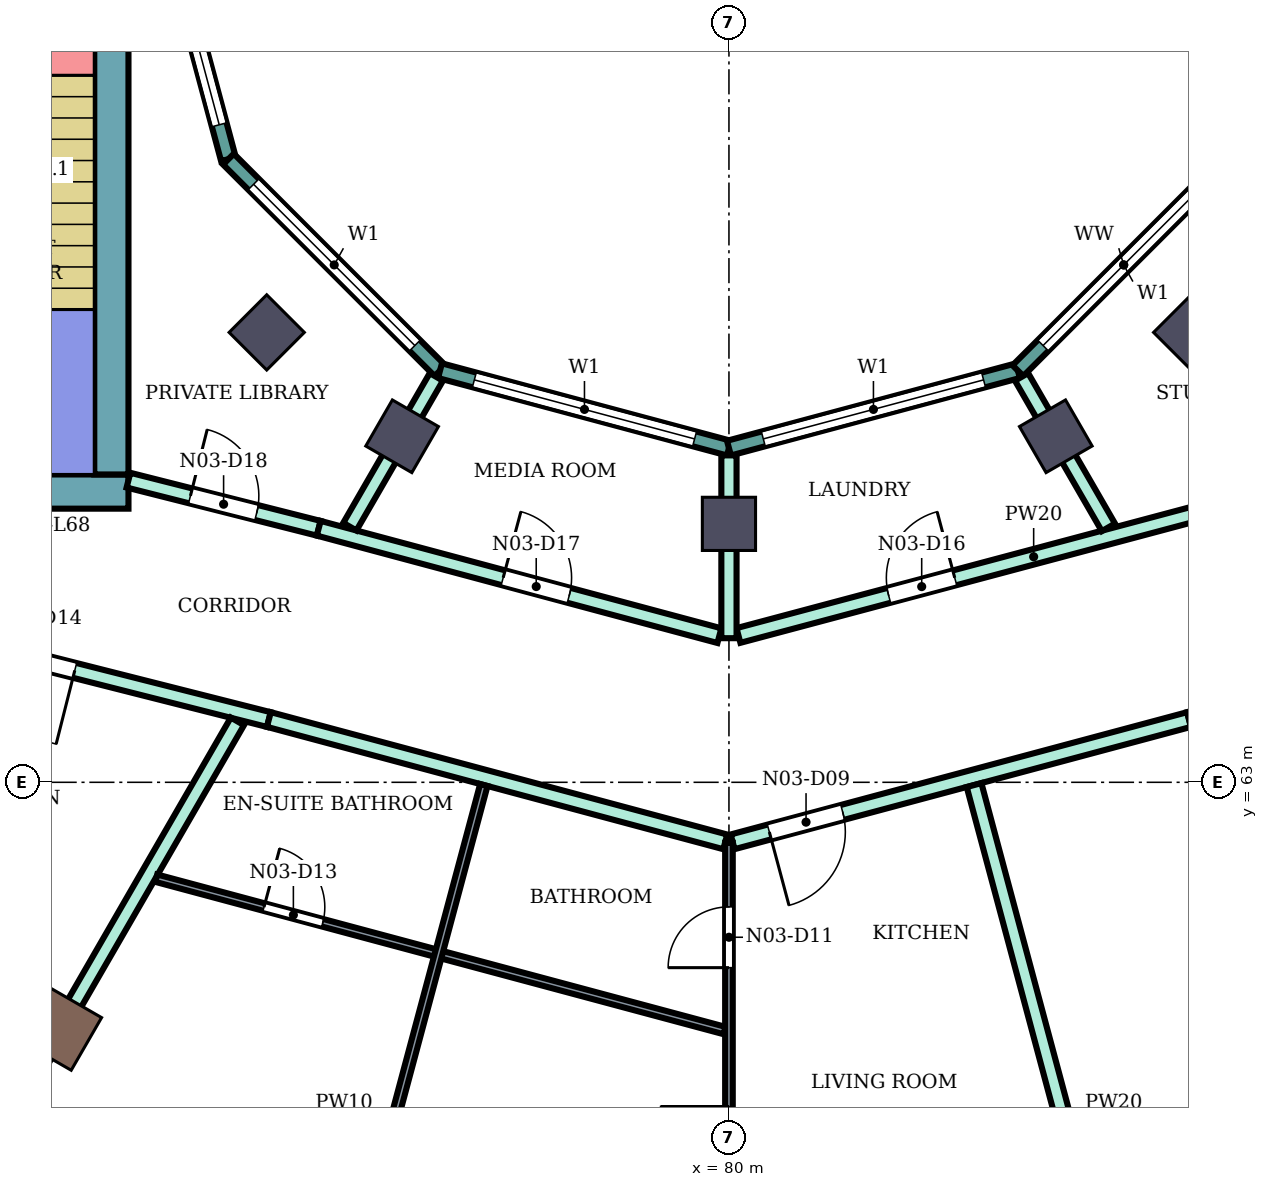
"""IFC4 building model, lengths in metres.
Left out: names, types, materials, properties, quantities, classifications, styles, units other than length and angle.
Written with IfcOpenShell. Run it as: python <this file> out.ifc"""

import sys

from ifc_helpers import new_model, si_unit, direction, frame, frame_2d, origin, origin_2d, place, context, subcontext, project, spatial, rectangle, extrude, element, fill, save


model = new_model("IFC4")
c1 = context("Model", 3, precision=1e-05, world=origin(), true_north=direction((0.0, 1.0)))
c2 = subcontext(c1, "Body", "Model", "MODEL_VIEW")
j1 = project(units=[si_unit("LENGTHUNIT", "METRE"), si_unit("PLANEANGLEUNIT", "RADIAN")], contexts=[c1])
p1 = place(None, origin())
s1 = spatial("IfcSite", under=j1, at=p1, CompositionType="ELEMENT")
p2 = place(p1, origin())
s2 = spatial("IfcBuilding", under=s1, at=p2, CompositionType="ELEMENT")
p3 = place(p2, frame((0.0, 0.0, 296.7)))
s3 = spatial("IfcBuildingStorey", under=s2, at=p3, CompositionType="ELEMENT", Elevation=296.7)
p4 = place(p3, frame((71.2, 59.758, 0.0), z_axis=(0.0, 0.0, 1.0), x_axis=(-0.5, -0.866025403784, 0.0)))
e1 = element("IfcColumn", 1, at=p4, inside=s3, PredefinedType="COLUMN", context=c2, shape_type="SweptSolid", body=[
    extrude(rectangle(XDim=0.8, YDim=0.8, at=origin_2d()), origin(), (0.0, 0.0, 1.0), 4.2),
])
for number, where, z_axis, x_axis in (
    (2, (73.919, 68.919, 0.0), (0.0, 0.0, 1.0), (-0.707, -0.707, 0.0)),
    (3, (75.7, 67.552, 0.0), (0.0, 0.0, 1.0), (-0.5, -0.866, 0.0)),
    (4, (80.0, 66.4, 0.0), (0.0, 0.0, 1.0), (0.0, -1.0, 0.0)),
    (5, (84.3, 67.552, 0.0), (0.0, 0.0, 1.0), (0.5, -0.866, 0.0)),
    (6, (86.081, 68.919, 0.0), (0.0, 0.0, 1.0), (0.707, -0.707, 0.0)),
):
    element("IfcColumn", number, at=place(p3, frame(where, z_axis=z_axis, x_axis=x_axis)), inside=s3, PredefinedType="COLUMN", context=c2, shape_type="SweptSolid", body=[
        extrude(rectangle(XDim=0.7, YDim=0.7, at=origin_2d()), origin(), (0.0, 0.0, 1.0), 4.2),
    ])
p5 = place(p3, frame((72.1, 66.825, 0.0), z_axis=(0.0, 0.0, 1.0), x_axis=(-1.0, 0.0, 0.0)))
e7 = element("IfcWall", 7, at=p5, inside=s3, PredefinedType="SHEAR", context=c2, shape_type="SweptSolid", body=[
    extrude(rectangle(XDim=12.0, YDim=0.45, at=frame_2d((6.0, 0.0))), origin(), (0.0, 0.0, 1.0), 3.88),
])
p6 = place(p5, frame((4.2, 0.0, 0.0)))
e8 = element("IfcOpeningElement", 8, at=p6, cuts=e7, PredefinedType="OPENING", context=c2, shape_type="SweptSolid", body=[
    extrude(rectangle(XDim=2.4, YDim=2.4, at=frame_2d((1.2, 1.2))), frame((0.0, 0.235, 0.0), z_axis=(0.0, -1.0, 0.0), x_axis=(1.0, 0.0, 0.0)), (0.0, 0.0, 1.0), 0.47),
])
p7 = place(p3, frame((71.875, 75.0, 0.0), z_axis=(0.0, 0.0, 1.0), x_axis=(0.0, -1.0, 0.0)))
e9 = element("IfcWall", 9, at=p7, inside=s3, PredefinedType="SHEAR", context=c2, shape_type="SweptSolid", body=[
    extrude(rectangle(XDim=7.95, YDim=0.45, at=frame_2d((3.975, 0.0))), origin(), (0.0, 0.0, 1.0), 3.88),
])
p8 = place(p3, frame((72.396, 75.0, 0.0), z_axis=(0.0, 0.0, 1.0), x_axis=(0.258789828301, -0.965933654434, 0.0)))
e10 = element("IfcWall", 10, at=p8, inside=s3, PredefinedType="NOTDEFINED", context=c2, shape_type="SweptSolid", body=[
    extrude(rectangle(XDim=3.936, YDim=0.2, at=frame_2d((1.968, 0.0))), origin(), (0.0, 0.0, 1.0), 4.2),
])
p9 = place(p8, frame((0.468, 0.0, 0.9)))
e11 = element("IfcOpeningElement", 11, at=p9, cuts=e10, PredefinedType="OPENING", context=c2, shape_type="SweptSolid", body=[
    extrude(rectangle(XDim=3.0, YDim=2.3, at=frame_2d((1.5, 1.15))), frame((0.0, 0.11, 0.0), z_axis=(0.0, -1.0, 0.0), x_axis=(1.0, 0.0, 0.0)), (0.0, 0.0, 1.0), 0.22),
])
p10 = place(p3, frame((73.415, 71.198, 0.0), z_axis=(0.0, 0.0, 1.0), x_axis=(0.707106781187, -0.707106781187, 0.0)))
e12 = element("IfcWall", 12, at=p10, inside=s3, PredefinedType="NOTDEFINED", context=c2, shape_type="SweptSolid", body=[
    extrude(rectangle(XDim=3.936, YDim=0.2, at=frame_2d((1.968, 0.0))), origin(), (0.0, 0.0, 1.0), 4.2),
])
p11 = place(p10, frame((0.468, 0.0, 0.9)))
e13 = element("IfcOpeningElement", 13, at=p11, cuts=e12, PredefinedType="OPENING", context=c2, shape_type="SweptSolid", body=[
    extrude(rectangle(XDim=3.0, YDim=2.3, at=frame_2d((1.5, 1.15))), frame((0.0, 0.11, 0.0), z_axis=(0.0, -1.0, 0.0), x_axis=(1.0, 0.0, 0.0)), (0.0, 0.0, 1.0), 0.22),
])
p12 = place(p3, frame((76.198, 68.415, 0.0), z_axis=(0.0, 0.0, 1.0), x_axis=(0.965933654434, -0.258789828301, 0.0)))
e14 = element("IfcWall", 14, at=p12, inside=s3, PredefinedType="NOTDEFINED", context=c2, shape_type="SweptSolid", body=[
    extrude(rectangle(XDim=3.936, YDim=0.2, at=frame_2d((1.968, 0.0))), origin(), (0.0, 0.0, 1.0), 4.2),
])
p13 = place(p12, frame((0.468, 0.0, 0.9)))
e15 = element("IfcOpeningElement", 15, at=p13, cuts=e14, PredefinedType="OPENING", context=c2, shape_type="SweptSolid", body=[
    extrude(rectangle(XDim=3.0, YDim=2.3, at=frame_2d((1.5, 1.15))), frame((0.0, 0.11, 0.0), z_axis=(0.0, -1.0, 0.0), x_axis=(1.0, 0.0, 0.0)), (0.0, 0.0, 1.0), 0.22),
])
p14 = place(p3, frame((80.0, 67.396, 0.0), z_axis=(0.0, 0.0, 1.0), x_axis=(0.965933654434, 0.258789828301, 0.0)))
e16 = element("IfcWall", 16, at=p14, inside=s3, PredefinedType="NOTDEFINED", context=c2, shape_type="SweptSolid", body=[
    extrude(rectangle(XDim=3.936, YDim=0.2, at=frame_2d((1.968, 0.0))), origin(), (0.0, 0.0, 1.0), 4.2),
])
p15 = place(p14, frame((0.468, 0.0, 0.9)))
e17 = element("IfcOpeningElement", 17, at=p15, cuts=e16, PredefinedType="OPENING", context=c2, shape_type="SweptSolid", body=[
    extrude(rectangle(XDim=3.0, YDim=2.3, at=frame_2d((1.5, 1.15))), frame((0.0, 0.11, 0.0), z_axis=(0.0, -1.0, 0.0), x_axis=(1.0, 0.0, 0.0)), (0.0, 0.0, 1.0), 0.22),
])
p16 = place(p3, frame((83.802, 68.415, 0.0), z_axis=(0.0, 0.0, 1.0), x_axis=(0.707106781187, 0.707106781187, 0.0)))
e18 = element("IfcWall", 18, at=p16, inside=s3, PredefinedType="NOTDEFINED", context=c2, shape_type="SweptSolid", body=[
    extrude(rectangle(XDim=3.936, YDim=0.2, at=frame_2d((1.968, 0.0))), origin(), (0.0, 0.0, 1.0), 4.2),
])
p17 = place(p16, frame((0.468, 0.0, 0.9)))
e19 = element("IfcOpeningElement", 19, at=p17, cuts=e18, PredefinedType="OPENING", context=c2, shape_type="SweptSolid", body=[
    extrude(rectangle(XDim=3.0, YDim=2.3, at=frame_2d((1.5, 1.15))), frame((0.0, 0.11, 0.0), z_axis=(0.0, -1.0, 0.0), x_axis=(1.0, 0.0, 0.0)), (0.0, 0.0, 1.0), 0.22),
])
p18 = place(p3, frame((68.201, 65.28, 0.0), z_axis=(0.0, 0.0, 1.0), x_axis=(0.969421088032, -0.245403247897, 0.0)))
e20 = element("IfcWall", 20, at=p18, inside=s3, PredefinedType="PARTITIONING", context=c2, shape_type="SweptSolid", body=[
    extrude(rectangle(XDim=5.927, YDim=0.2, at=frame_2d((2.964, 0.0))), origin(), (0.0, 0.0, 1.0), 3.75),
])
p19 = place(p18, frame((2.293, 0.0, 0.0)))
e21 = element("IfcOpeningElement", 21, at=p19, cuts=e20, PredefinedType="OPENING", context=c2, shape_type="SweptSolid", body=[
    extrude(rectangle(XDim=1.0, YDim=2.1, at=frame_2d((0.5, 1.05))), frame((0.0, 0.11, 0.0), z_axis=(0.0, -1.0, 0.0), x_axis=(1.0, 0.0, 0.0)), (0.0, 0.0, 1.0), 0.22),
])
p20 = place(p3, frame((68.849, 55.692, 0.0), z_axis=(0.0, 0.0, 1.0), x_axis=(0.50011732958, 0.865957652922, 0.0)))
e22 = element("IfcWall", 22, at=p20, inside=s3, PredefinedType="PARTITIONING", context=c2, shape_type="SweptSolid", body=[
    extrude(rectangle(XDim=9.365, YDim=0.2, at=frame_2d((4.683, 0.0))), origin(), (0.0, 0.0, 1.0), 3.75),
])
p21 = place(p3, frame((72.1, 66.975, 0.0), z_axis=(0.0, 0.0, 1.0), x_axis=(0.969471314457, -0.245204752086, 0.0)))
e23 = element("IfcWall", 23, at=p21, inside=s3, PredefinedType="PARTITIONING", context=c2, shape_type="SweptSolid", body=[
    extrude(rectangle(XDim=2.582, YDim=0.2, at=frame_2d((1.291, 0.0))), origin(), (0.0, 0.0, 1.0), 3.75),
])
p22 = place(p21, frame((0.841, 0.0, 0.0)))
e24 = element("IfcOpeningElement", 24, at=p22, cuts=e23, PredefinedType="OPENING", context=c2, shape_type="SweptSolid", body=[
    extrude(rectangle(XDim=0.9, YDim=2.1, at=frame_2d((0.45, 1.05))), frame((0.0, 0.11, 0.0), z_axis=(0.0, -1.0, 0.0), x_axis=(1.0, 0.0, 0.0)), (0.0, 0.0, 1.0), 0.22),
])
p23 = place(p3, frame((73.947, 63.826, 0.0), z_axis=(0.0, 0.0, 1.0), x_axis=(0.965908253407, -0.258884619088, 0.0)))
e25 = element("IfcWall", 25, at=p23, inside=s3, PredefinedType="PARTITIONING", context=c2, shape_type="SweptSolid", body=[
    extrude(rectangle(XDim=6.217, YDim=0.2, at=frame_2d((3.108, 0.0))), origin(), (0.0, 0.0, 1.0), 3.75),
])
p24 = place(p3, frame((74.603, 66.342, 0.0), z_axis=(0.0, 0.0, 1.0), x_axis=(0.965920893652, -0.258837453254, 0.0)))
e26 = element("IfcWall", 26, at=p24, inside=s3, PredefinedType="PARTITIONING", context=c2, shape_type="SweptSolid", body=[
    extrude(rectangle(XDim=5.458, YDim=0.2, at=frame_2d((2.729, 0.0))), origin(), (0.0, 0.0, 1.0), 3.75),
])
p25 = place(p24, frame((2.512, 0.0, 0.0)))
e27 = element("IfcOpeningElement", 27, at=p25, cuts=e26, PredefinedType="OPENING", context=c2, shape_type="SweptSolid", body=[
    extrude(rectangle(XDim=0.9, YDim=2.1, at=frame_2d((0.45, 1.05))), frame((0.0, 0.11, 0.0), z_axis=(0.0, -1.0, 0.0), x_axis=(1.0, 0.0, 0.0)), (0.0, 0.0, 1.0), 0.22),
])
p26 = place(p3, frame((75.012, 66.363, 0.0), z_axis=(0.0, 0.0, 1.0), x_axis=(0.500097042406, 0.865969369075, 0.0)))
e28 = element("IfcWall", 28, at=p26, inside=s3, PredefinedType="PARTITIONING", context=c2, shape_type="SweptSolid", body=[
    extrude(rectangle(XDim=2.275, YDim=0.2, at=frame_2d((1.138, 0.0))), origin(), (0.0, 0.0, 1.0), 3.75),
])
p27 = place(p3, frame((80.125, 64.932, 0.0), z_axis=(0.0, 0.0, 1.0), x_axis=(0.966236955806, 0.257655089674, 0.0)))
e29 = element("IfcWall", 29, at=p27, inside=s3, PredefinedType="PARTITIONING", context=c2, shape_type="SweptSolid", body=[
    extrude(rectangle(XDim=8.039, YDim=0.2, at=frame_2d((4.02, 0.0))), origin(), (0.0, 0.0, 1.0), 3.75),
])
p28 = place(p27, frame((6.298, 0.0, 0.0)))
e30 = element("IfcOpeningElement", 30, at=p28, cuts=e29, PredefinedType="OPENING", context=c2, shape_type="SweptSolid", body=[
    extrude(rectangle(XDim=0.9, YDim=2.1, at=frame_2d((0.45, 1.05))), frame((0.0, 0.11, 0.0), z_axis=(0.0, -1.0, 0.0), x_axis=(1.0, 0.0, 0.0)), (0.0, 0.0, 1.0), 0.22),
])
p29 = place(p27, frame((2.045, 0.0, 0.0)))
e31 = element("IfcOpeningElement", 31, at=p29, cuts=e29, PredefinedType="OPENING", context=c2, shape_type="SweptSolid", body=[
    extrude(rectangle(XDim=0.9, YDim=2.1, at=frame_2d((0.45, 1.05))), frame((0.0, 0.11, 0.0), z_axis=(0.0, -1.0, 0.0), x_axis=(1.0, 0.0, 0.0)), (0.0, 0.0, 1.0), 0.22),
])
p30 = place(p3, frame((80.048, 62.217, 0.0), z_axis=(0.0, 0.0, 1.0), x_axis=(0.965937709386, 0.258774692708, 0.0)))
e32 = element("IfcWall", 32, at=p30, inside=s3, PredefinedType="PARTITIONING", context=c2, shape_type="SweptSolid", body=[
    extrude(rectangle(XDim=6.216, YDim=0.2, at=frame_2d((3.108, 0.0))), origin(), (0.0, 0.0, 1.0), 3.75),
])
p31 = place(p30, frame((0.5, 0.0, 0.0)))
e33 = element("IfcOpeningElement", 33, at=p31, cuts=e32, PredefinedType="OPENING", context=c2, shape_type="SweptSolid", body=[
    extrude(rectangle(XDim=1.0, YDim=2.1, at=frame_2d((0.5, 1.05))), frame((0.0, 0.11, 0.0), z_axis=(0.0, -1.0, 0.0), x_axis=(1.0, 0.0, 0.0)), (0.0, 0.0, 1.0), 0.22),
])
p32 = place(p3, frame((80.0, 64.896, 0.0), z_axis=(0.0, 0.0, 1.0), x_axis=(0.0, 1.0, 0.0)))
e34 = element("IfcWall", 34, at=p32, inside=s3, PredefinedType="PARTITIONING", context=c2, shape_type="SweptSolid", body=[
    extrude(rectangle(XDim=2.405, YDim=0.2, at=frame_2d((1.203, 0.0))), origin(), (0.0, 0.0, 1.0), 3.75),
])
p33 = place(p3, frame((83.225, 62.963, 0.0), z_axis=(0.0, 0.0, 1.0), x_axis=(0.258782398991, -0.96593564484, 0.0)))
e35 = element("IfcWall", 35, at=p33, inside=s3, PredefinedType="PARTITIONING", context=c2, shape_type="SweptSolid", body=[
    extrude(rectangle(XDim=9.837, YDim=0.2, at=frame_2d((4.918, 0.0))), origin(), (0.0, 0.0, 1.0), 3.75),
])
p34 = place(p3, frame((83.85, 68.333, 0.0), z_axis=(0.0, 0.0, 1.0), x_axis=(0.500080019051, -0.865979199835, 0.0)))
e36 = element("IfcWall", 36, at=p34, inside=s3, PredefinedType="PARTITIONING", context=c2, shape_type="SweptSolid", body=[
    extrude(rectangle(XDim=2.285, YDim=0.2, at=frame_2d((1.143, 0.0))), origin(), (0.0, 0.0, 1.0), 3.75),
])
p35 = place(p3, frame((86.053, 63.826, 0.0), z_axis=(0.0, 0.0, 1.0), x_axis=(0.969480070232, 0.245170131586, 0.0)))
e37 = element("IfcWall", 37, at=p35, inside=s3, PredefinedType="PARTITIONING", context=c2, shape_type="SweptSolid", body=[
    extrude(rectangle(XDim=5.907, YDim=0.2, at=frame_2d((2.954, 0.0))), origin(), (0.0, 0.0, 1.0), 3.75),
])
p36 = place(p35, frame((2.464, 0.0, 0.0)))
e38 = element("IfcOpeningElement", 38, at=p36, cuts=e37, PredefinedType="OPENING", context=c2, shape_type="SweptSolid", body=[
    extrude(rectangle(XDim=1.0, YDim=2.1, at=frame_2d((0.5, 1.05))), frame((0.0, 0.11, 0.0), z_axis=(0.0, -1.0, 0.0), x_axis=(1.0, 0.0, 0.0)), (0.0, 0.0, 1.0), 0.22),
])
p37 = place(p3, frame((72.465, 61.739, 0.0), z_axis=(0.0, 0.0, 1.0), x_axis=(0.965899611634, -0.258916859715, 0.0)))
e39 = element("IfcWall", 39, at=p37, inside=s3, PredefinedType="PARTITIONING", context=c2, shape_type="SweptSolid", body=[
    extrude(rectangle(XDim=7.74, YDim=0.1, at=frame_2d((3.87, 0.0))), origin(), (0.0, 0.0, 1.0), 3.75),
])
p38 = place(p37, frame((1.468, 0.0, 0.0)))
e40 = element("IfcOpeningElement", 40, at=p38, cuts=e39, PredefinedType="OPENING", context=c2, shape_type="SweptSolid", body=[
    extrude(rectangle(XDim=0.8, YDim=2.1, at=frame_2d((0.4, 1.05))), frame((0.0, 0.06, 0.0), z_axis=(0.0, -1.0, 0.0), x_axis=(1.0, 0.0, 0.0)), (0.0, 0.0, 1.0), 0.12),
])
p39 = place(p3, frame((74.229, 53.462, 0.0), z_axis=(0.0, 0.0, 1.0), x_axis=(0.258810097991, 0.965928223616, 0.0)))
e41 = element("IfcWall", 41, at=p39, inside=s3, PredefinedType="PARTITIONING", context=c2, shape_type="SweptSolid", body=[
    extrude(rectangle(XDim=9.838, YDim=0.1, at=frame_2d((4.919, 0.0))), origin(), (0.0, 0.0, 1.0), 3.75),
])
p40 = place(p39, frame((3.344, 0.0, 0.0)))
e42 = element("IfcOpeningElement", 42, at=p40, cuts=e41, PredefinedType="OPENING", context=c2, shape_type="SweptSolid", body=[
    extrude(rectangle(XDim=0.9, YDim=2.1, at=frame_2d((0.45, 1.05))), frame((0.0, 0.06, 0.0), z_axis=(0.0, -1.0, 0.0), x_axis=(1.0, 0.0, 0.0)), (0.0, 0.0, 1.0), 0.12),
])
p41 = place(p3, frame((80.0, 55.3, 0.0), z_axis=(0.0, 0.0, 1.0), x_axis=(0.0, 1.0, 0.0)))
e43 = element("IfcWall", 43, at=p41, inside=s3, PredefinedType="PARTITIONING", context=c2, shape_type="SweptSolid", body=[
    extrude(rectangle(XDim=6.904, YDim=0.1, at=frame_2d((3.452, 0.0))), origin(), (0.0, 0.0, 1.0), 3.75),
])
p42 = place(p41, frame((2.534, 0.0, 0.0)))
e44 = element("IfcOpeningElement", 44, at=p42, cuts=e43, PredefinedType="OPENING", context=c2, shape_type="SweptSolid", body=[
    extrude(rectangle(XDim=0.9, YDim=2.1, at=frame_2d((0.45, 1.05))), frame((0.0, 0.06, 0.0), z_axis=(0.0, -1.0, 0.0), x_axis=(1.0, 0.0, 0.0)), (0.0, 0.0, 1.0), 0.12),
])
p43 = place(p41, frame((5.261, 0.0, 0.0)))
e45 = element("IfcOpeningElement", 45, at=p43, cuts=e43, PredefinedType="OPENING", context=c2, shape_type="SweptSolid", body=[
    extrude(rectangle(XDim=0.8, YDim=2.1, at=frame_2d((0.4, 1.05))), frame((0.0, 0.06, 0.0), z_axis=(0.0, -1.0, 0.0), x_axis=(1.0, 0.0, 0.0)), (0.0, 0.0, 1.0), 0.12),
])
p44 = place(p9, origin())
e46 = element("IfcWindow", 46, at=p44, inside=s3, PartitioningType="SINGLE_PANEL", PredefinedType="WINDOW", context=c2, shape_type="SweptSolid", body=[
    extrude(rectangle(XDim=3.0, YDim=2.3, at=frame_2d((1.5, 1.15))), frame((0.0, 0.03, 0.0), z_axis=(0.0, -1.0, 0.0), x_axis=(1.0, 0.0, 0.0)), (0.0, 0.0, 1.0), 0.06),
])
fill(e11, e46)
p45 = place(p11, origin())
e47 = element("IfcWindow", 47, at=p45, inside=s3, PartitioningType="SINGLE_PANEL", PredefinedType="WINDOW", context=c2, shape_type="SweptSolid", body=[
    extrude(rectangle(XDim=3.0, YDim=2.3, at=frame_2d((1.5, 1.15))), frame((0.0, 0.03, 0.0), z_axis=(0.0, -1.0, 0.0), x_axis=(1.0, 0.0, 0.0)), (0.0, 0.0, 1.0), 0.06),
])
fill(e13, e47)
p46 = place(p13, origin())
e48 = element("IfcWindow", 48, at=p46, inside=s3, PartitioningType="SINGLE_PANEL", PredefinedType="WINDOW", context=c2, shape_type="SweptSolid", body=[
    extrude(rectangle(XDim=3.0, YDim=2.3, at=frame_2d((1.5, 1.15))), frame((0.0, 0.03, 0.0), z_axis=(0.0, -1.0, 0.0), x_axis=(1.0, 0.0, 0.0)), (0.0, 0.0, 1.0), 0.06),
])
fill(e15, e48)
p47 = place(p15, origin())
e49 = element("IfcWindow", 49, at=p47, inside=s3, PartitioningType="SINGLE_PANEL", PredefinedType="WINDOW", context=c2, shape_type="SweptSolid", body=[
    extrude(rectangle(XDim=3.0, YDim=2.3, at=frame_2d((1.5, 1.15))), frame((0.0, 0.03, 0.0), z_axis=(0.0, -1.0, 0.0), x_axis=(1.0, 0.0, 0.0)), (0.0, 0.0, 1.0), 0.06),
])
fill(e17, e49)
p48 = place(p17, origin())
e50 = element("IfcWindow", 50, at=p48, inside=s3, PartitioningType="SINGLE_PANEL", PredefinedType="WINDOW", context=c2, shape_type="SweptSolid", body=[
    extrude(rectangle(XDim=3.0, YDim=2.3, at=frame_2d((1.5, 1.15))), frame((0.0, 0.03, 0.0), z_axis=(0.0, -1.0, 0.0), x_axis=(1.0, 0.0, 0.0)), (0.0, 0.0, 1.0), 0.06),
])
fill(e19, e50)
p49 = place(p31, frame((1.0, 0.0, 0.0), z_axis=(0.0, 0.0, 1.0), x_axis=(-1.0, 0.0, 0.0)))
e51 = element("IfcDoor", 51, at=p49, inside=s3, OperationType="SINGLE_SWING_RIGHT", PredefinedType="DOOR", context=c2, shape_type="SweptSolid", body=[
    extrude(rectangle(XDim=1.0, YDim=2.1, at=frame_2d((0.5, 1.05))), frame((0.0, 0.025, 0.0), z_axis=(0.0, -1.0, 0.0), x_axis=(1.0, 0.0, 0.0)), (0.0, 0.0, 1.0), 0.05),
])
fill(e33, e51)
p50 = place(p42, origin())
e52 = element("IfcDoor", 52, at=p50, inside=s3, OperationType="SINGLE_SWING_RIGHT", PredefinedType="DOOR", context=c2, shape_type="SweptSolid", body=[
    extrude(rectangle(XDim=0.9, YDim=2.1, at=frame_2d((0.45, 1.05))), frame((0.0, 0.025, 0.0), z_axis=(0.0, -1.0, 0.0), x_axis=(1.0, 0.0, 0.0)), (0.0, 0.0, 1.0), 0.05),
])
fill(e44, e52)
p51 = place(p43, origin())
e53 = element("IfcDoor", 53, at=p51, inside=s3, OperationType="SINGLE_SWING_LEFT", PredefinedType="DOOR", context=c2, shape_type="SweptSolid", body=[
    extrude(rectangle(XDim=0.8, YDim=2.1, at=frame_2d((0.4, 1.05))), frame((0.0, 0.025, 0.0), z_axis=(0.0, -1.0, 0.0), x_axis=(1.0, 0.0, 0.0)), (0.0, 0.0, 1.0), 0.05),
])
fill(e45, e53)
p52 = place(p38, origin())
e54 = element("IfcDoor", 54, at=p52, inside=s3, OperationType="SINGLE_SWING_LEFT", PredefinedType="DOOR", context=c2, shape_type="SweptSolid", body=[
    extrude(rectangle(XDim=0.8, YDim=2.1, at=frame_2d((0.4, 1.05))), frame((0.0, 0.025, 0.0), z_axis=(0.0, -1.0, 0.0), x_axis=(1.0, 0.0, 0.0)), (0.0, 0.0, 1.0), 0.05),
])
fill(e40, e54)
p53 = place(p19, frame((1.0, 0.0, 0.0), z_axis=(0.0, 0.0, 1.0), x_axis=(-1.0, 0.0, 0.0)))
e55 = element("IfcDoor", 55, at=p53, inside=s3, OperationType="SINGLE_SWING_LEFT", PredefinedType="DOOR", context=c2, shape_type="SweptSolid", body=[
    extrude(rectangle(XDim=1.0, YDim=2.1, at=frame_2d((0.5, 1.05))), frame((0.0, 0.025, 0.0), z_axis=(0.0, -1.0, 0.0), x_axis=(1.0, 0.0, 0.0)), (0.0, 0.0, 1.0), 0.05),
])
fill(e21, e55)
p54 = place(p29, origin())
e56 = element("IfcDoor", 56, at=p54, inside=s3, OperationType="SINGLE_SWING_RIGHT", PredefinedType="DOOR", context=c2, shape_type="SweptSolid", body=[
    extrude(rectangle(XDim=0.9, YDim=2.1, at=frame_2d((0.45, 1.05))), frame((0.0, 0.025, 0.0), z_axis=(0.0, -1.0, 0.0), x_axis=(1.0, 0.0, 0.0)), (0.0, 0.0, 1.0), 0.05),
])
fill(e31, e56)
p55 = place(p25, origin())
e57 = element("IfcDoor", 57, at=p55, inside=s3, OperationType="SINGLE_SWING_LEFT", PredefinedType="DOOR", context=c2, shape_type="SweptSolid", body=[
    extrude(rectangle(XDim=0.9, YDim=2.1, at=frame_2d((0.45, 1.05))), frame((0.0, 0.025, 0.0), z_axis=(0.0, -1.0, 0.0), x_axis=(1.0, 0.0, 0.0)), (0.0, 0.0, 1.0), 0.05),
])
fill(e27, e57)
p56 = place(p22, origin())
e58 = element("IfcDoor", 58, at=p56, inside=s3, OperationType="SINGLE_SWING_LEFT", PredefinedType="DOOR", context=c2, shape_type="SweptSolid", body=[
    extrude(rectangle(XDim=0.9, YDim=2.1, at=frame_2d((0.45, 1.05))), frame((0.0, 0.025, 0.0), z_axis=(0.0, -1.0, 0.0), x_axis=(1.0, 0.0, 0.0)), (0.0, 0.0, 1.0), 0.05),
])
fill(e24, e58)
save(model, sys.argv[1])
